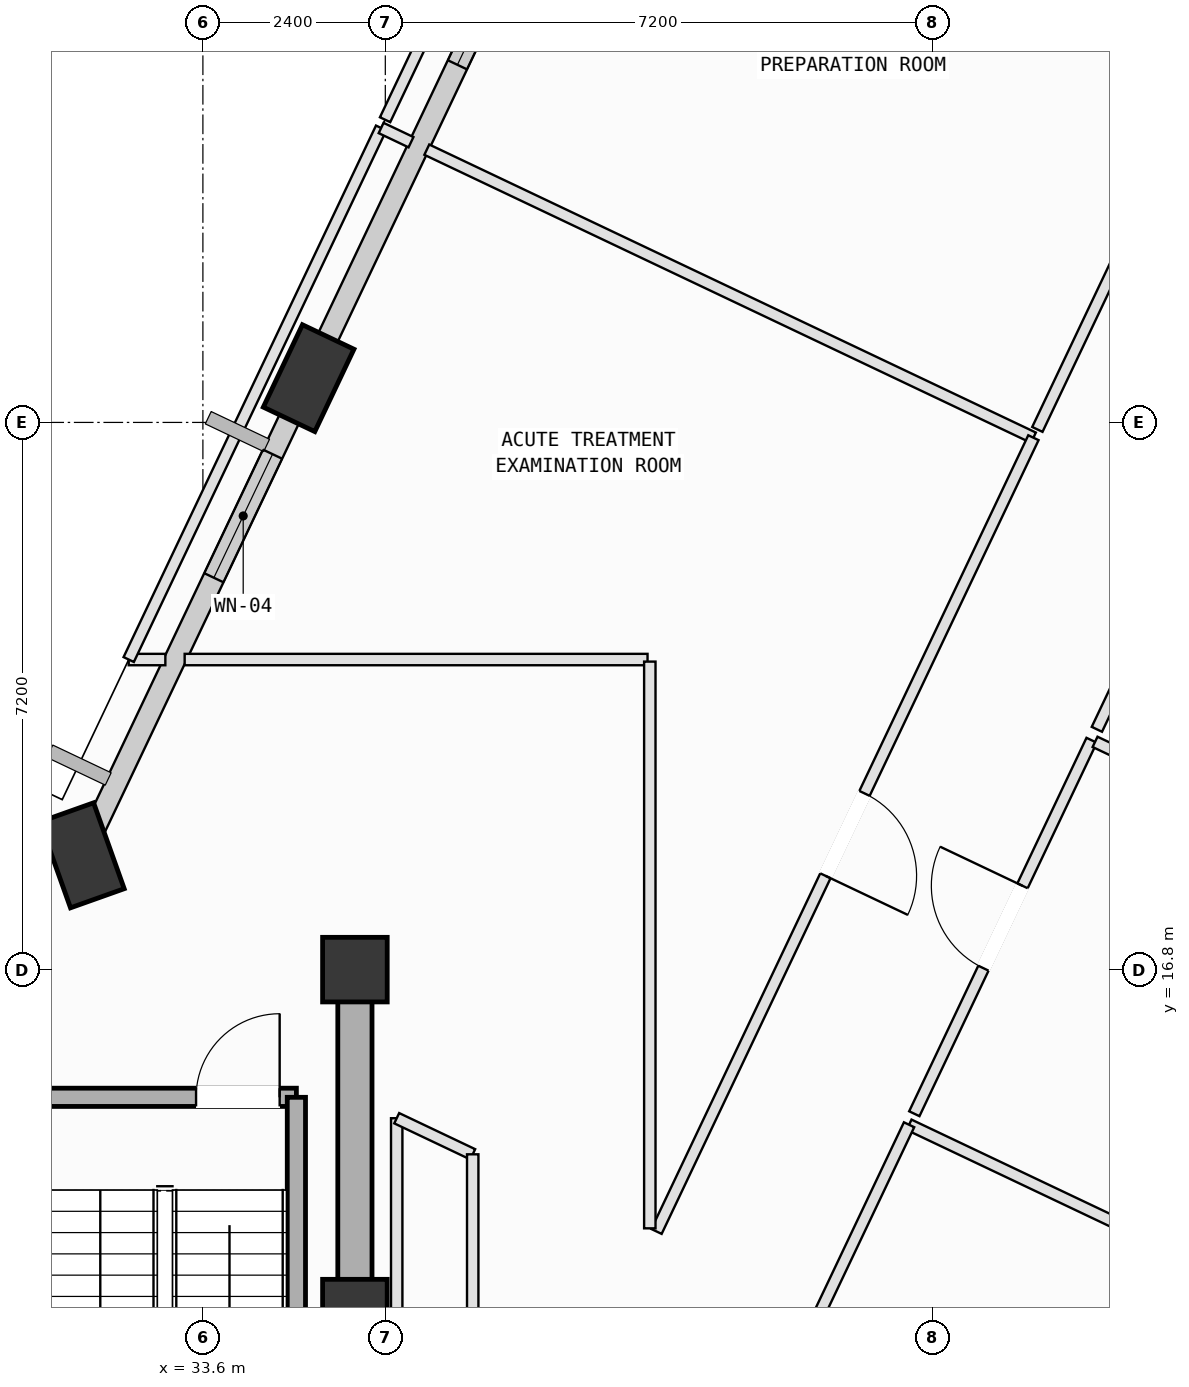
"""IFC4 building model, lengths in metres.
Left out: names, types, materials, properties, quantities, classifications, styles, units other than length and angle.
Written with IfcOpenShell. Run it as: python <this file> out.ifc"""

import sys

from ifc_helpers import new_model, si_unit, direction, frame, frame_2d, origin, origin_2d, place, context, subcontext, project, spatial, rectangle, extrude, element, fill, save


model = new_model("IFC4")
c1 = context("Model", 3, precision=1e-05, world=origin(), true_north=direction((0.0, 1.0)))
c2 = subcontext(c1, "Body", "Model", "MODEL_VIEW")
j1 = project(units=[si_unit("LENGTHUNIT", "METRE"), si_unit("PLANEANGLEUNIT", "RADIAN")], contexts=[c1])
p1 = place(None, origin())
s1 = spatial("IfcSite", under=j1, at=p1, CompositionType="ELEMENT")
p2 = place(p1, origin())
s2 = spatial("IfcBuilding", under=s1, at=p2, CompositionType="ELEMENT")
p3 = place(p2, frame((0.0, 0.0, 300.6)))
s3 = spatial("IfcBuildingStorey", under=s2, at=p3, CompositionType="ELEMENT", Elevation=300.6)
for number, where, z_axis, x_axis in (
    (1, (35.6, 12.3, 0.0), (0.0, 0.0, 1.0), (1.0, 0.0, 0.0)),
    (2, (35.6, 16.8, 0.0), (0.0, 0.0, 1.0), (1.0, 0.0, 0.0)),
):
    element("IfcColumn", number, at=place(p3, frame(where, z_axis=z_axis, x_axis=x_axis)), inside=s3, PredefinedType="COLUMN", context=c2, shape_type="SweptSolid", body=[
        extrude(rectangle(XDim=0.85, YDim=0.85, at=origin_2d()), origin(), (0.0, 0.0, 1.0), 4.0),
    ])
p4 = place(p3, frame((34.991, 24.582, 0.002), z_axis=(0.000855260499, 0.005803553386, 0.999982793501), x_axis=(-0.556050371387, -0.83113170028, 0.005299176292)))
e3 = element("IfcColumn", 3, at=p4, inside=s3, PredefinedType="COLUMN", context=c2, shape_type="SweptSolid", body=[
    extrude(rectangle(XDim=1.2, YDim=0.75, at=origin_2d()), origin(), (0.0, 0.0, 1.0), 3.996),
])
p5 = place(p3, frame((32.01, 18.304, 0.002), z_axis=(0.026991866876, -0.006412095072, 0.999615088001), x_axis=(-0.993728764911, -0.108720172199, 0.026135530332)))
e4 = element("IfcColumn", 4, at=p5, inside=s3, PredefinedType="COLUMN", context=c2, shape_type="SweptSolid", body=[
    extrude(rectangle(XDim=1.2, YDim=0.75, at=origin_2d()), origin(), (0.0, 0.0, 1.0), 3.998),
])
p6 = place(p3, frame((35.167, 24.951, 0.0), z_axis=(0.0, 0.0, 1.0), x_axis=(0.42889830824, 0.903352777817, 0.0)))
e5 = element("IfcWall", 5, at=p6, inside=s3, PredefinedType="SOLIDWALL", context=c2, shape_type="SweptSolid", body=[
    extrude(rectangle(XDim=6.409, YDim=0.28, at=frame_2d((3.205, 0.0))), origin(), (0.0, 0.0, 1.0), 3.265),
])
p7 = place(p6, frame((4.156, 0.0, 0.75)))
e6 = element("IfcOpeningElement", 6, at=p7, cuts=e5, PredefinedType="OPENING", context=c2, shape_type="SweptSolid", body=[
    extrude(rectangle(XDim=1.4, YDim=1.85, at=frame_2d((0.7, 0.925))), frame((0.0, 0.15, 0.0), z_axis=(0.0, -1.0, 0.0), x_axis=(1.0, 0.0, 0.0)), (0.0, 0.0, 1.0), 0.3),
])
p8 = place(p3, frame((32.184, 18.67, 0.0), z_axis=(0.0, 0.0, 1.0), x_axis=(0.428931463167, 0.90333703561, 0.0)))
e7 = element("IfcWall", 7, at=p8, inside=s3, PredefinedType="SOLIDWALL", context=c2, shape_type="SweptSolid", body=[
    extrude(rectangle(XDim=6.158, YDim=0.28, at=frame_2d((3.079, 0.0))), origin(), (0.0, 0.0, 1.0), 3.265),
])
p9 = place(p8, frame((3.638, 0.0, 0.75)))
e8 = element("IfcOpeningElement", 8, at=p9, cuts=e7, PredefinedType="OPENING", context=c2, shape_type="SweptSolid", body=[
    extrude(rectangle(XDim=1.8, YDim=2.05, at=frame_2d((0.9, 1.025))), frame((0.0, 0.15, 0.0), z_axis=(0.0, -1.0, 0.0), x_axis=(1.0, 0.0, 0.0)), (0.0, 0.0, 1.0), 0.3),
])
p10 = place(p3, frame((25.415, 21.436, 0.0), z_axis=(0.0, 0.0, 1.0), x_axis=(0.903343787047, -0.428917244236, 0.0)))
e9 = element("IfcWall", 9, at=p10, inside=s3, PredefinedType="SOLIDWALL", context=c2, shape_type="SweptSolid", body=[
    extrude(rectangle(XDim=6.958, YDim=0.28, at=frame_2d((3.479, 0.0))), origin(), (0.0, 0.0, 1.0), 3.165),
])
p11 = place(p3, frame((31.37, 15.12, 0.0), z_axis=(0.0, 0.0, 1.0), x_axis=(1.0, 0.0, 0.0)))
e10 = element("IfcWall", 10, at=p11, inside=s3, PredefinedType="SOLIDWALL", context=c2, shape_type="SweptSolid", body=[
    extrude(rectangle(XDim=3.46, YDim=0.24, at=frame_2d((1.73, 0.0))), origin(), (0.0, 0.0, 1.0), 3.78),
])
p12 = place(p11, frame((2.14, 0.0, 0.0)))
e11 = element("IfcOpeningElement", 11, at=p12, cuts=e10, PredefinedType="OPENING", context=c2, shape_type="SweptSolid", body=[
    extrude(rectangle(XDim=1.1, YDim=2.15, at=frame_2d((0.55, 1.075))), frame((0.0, 0.13, 0.0), z_axis=(0.0, -1.0, 0.0), x_axis=(1.0, 0.0, 0.0)), (0.0, 0.0, 1.0), 0.26),
])
p13 = place(p3, frame((34.83, 15.12, 0.0), z_axis=(0.0, 0.0, 1.0), x_axis=(0.0, -1.0, 0.0)))
e12 = element("IfcWall", 12, at=p13, inside=s3, PredefinedType="SOLIDWALL", context=c2, shape_type="SweptSolid", body=[
    extrude(rectangle(XDim=7.095, YDim=0.24, at=frame_2d((3.548, 0.0))), origin(), (0.0, 0.0, 1.0), 3.78),
])
p14 = place(p3, frame((35.6, 7.8, 0.0), z_axis=(0.0, 0.0, 1.0), x_axis=(0.0, 1.0, 0.0)))
e13 = element("IfcWall", 13, at=p14, inside=s3, PredefinedType="SHEAR", context=c2, shape_type="SweptSolid", body=[
    extrude(rectangle(XDim=9.0, YDim=0.45, at=frame_2d((4.5, 0.0))), origin(), (0.0, 0.0, 1.0), 3.78),
])
p15 = place(p3, frame((42.891, 14.759, 0.0), z_axis=(0.0, 0.0, 1.0), x_axis=(0.903330146776, -0.428945970871, 0.0)))
e14 = element("IfcWall", 14, at=p15, inside=s3, PredefinedType="PARTITIONING", context=c2, shape_type="SweptSolid", body=[
    extrude(rectangle(XDim=9.435, YDim=0.15, at=frame_2d((4.718, 0.0))), origin(), (0.0, 0.0, 1.0), 3.78),
])
p16 = place(p3, frame((39.48, 7.575, 0.0), z_axis=(0.0, 0.0, 1.0), x_axis=(0.428922806164, 0.903341146163, 0.0)))
e15 = element("IfcWall", 15, at=p16, inside=s3, PredefinedType="PARTITIONING", context=c2, shape_type="SweptSolid", body=[
    extrude(rectangle(XDim=7.953, YDim=0.15, at=frame_2d((3.977, 0.0))), origin(), (0.0, 0.0, 1.0), 3.78),
])
p17 = place(p16, frame((3.376, 0.0, 0.0)))
e16 = element("IfcOpeningElement", 16, at=p17, cuts=e15, PredefinedType="OPENING", context=c2, shape_type="SweptSolid", body=[
    extrude(rectangle(XDim=1.2, YDim=2.15, at=frame_2d((0.6, 1.075))), frame((0.0, 0.085, 0.0), z_axis=(0.0, -1.0, 0.0), x_axis=(1.0, 0.0, 0.0)), (0.0, 0.0, 1.0), 0.17),
])
p18 = place(p3, frame((42.96, 14.904, 0.0), z_axis=(0.0, 0.0, 1.0), x_axis=(0.428881036616, 0.903360977921, 0.0)))
e17 = element("IfcWall", 17, at=p18, inside=s3, PredefinedType="PARTITIONING", context=c2, shape_type="SweptSolid", body=[
    extrude(rectangle(XDim=5.44, YDim=0.15, at=frame_2d((2.72, 0.0))), origin(), (0.0, 0.0, 1.0), 3.78),
])
p19 = place(p18, frame((2.12, 0.0, 0.0)))
e18 = element("IfcOpeningElement", 18, at=p19, cuts=e17, PredefinedType="OPENING", context=c2, shape_type="SweptSolid", body=[
    extrude(rectangle(XDim=1.2, YDim=2.15, at=frame_2d((0.6, 1.075))), frame((0.0, 0.085, 0.0), z_axis=(0.0, -1.0, 0.0), x_axis=(1.0, 0.0, 0.0)), (0.0, 0.0, 1.0), 0.17),
])
p20 = place(p3, frame((45.338, 19.797, 0.0), z_axis=(0.0, 0.0, 1.0), x_axis=(0.90331631407, -0.428975100367, 0.0)))
e19 = element("IfcWall", 19, at=p20, inside=s3, PredefinedType="PARTITIONING", context=c2, shape_type="SweptSolid", body=[
    extrude(rectangle(XDim=9.385, YDim=0.15, at=frame_2d((4.693, 0.0))), origin(), (0.0, 0.0, 1.0), 3.78),
])
p21 = place(p3, frame((45.362, 19.962, 0.0), z_axis=(0.0, 0.0, 1.0), x_axis=(0.428857978155, 0.903371924831, 0.0)))
e20 = element("IfcWall", 20, at=p21, inside=s3, PredefinedType="PARTITIONING", context=c2, shape_type="SweptSolid", body=[
    extrude(rectangle(XDim=8.24, YDim=0.15, at=frame_2d((4.12, 0.0))), origin(), (0.0, 0.0, 1.0), 3.415),
])
p22 = place(p21, frame((3.52, 0.0, 0.0)))
e21 = element("IfcOpeningElement", 21, at=p22, cuts=e20, PredefinedType="OPENING", context=c2, shape_type="SweptSolid", body=[
    extrude(rectangle(XDim=1.2, YDim=2.15, at=frame_2d((0.6, 1.075))), frame((0.0, 0.085, 0.0), z_axis=(0.0, -1.0, 0.0), x_axis=(1.0, 0.0, 0.0)), (0.0, 0.0, 1.0), 0.17),
])
p23 = place(p3, frame((36.15, 7.5, 0.0), z_axis=(0.0, 0.0, 1.0), x_axis=(0.0, 1.0, 0.0)))
e22 = element("IfcWall", 22, at=p23, inside=s3, PredefinedType="PARTITIONING", context=c2, shape_type="SweptSolid", body=[
    extrude(rectangle(XDim=7.345, YDim=0.15, at=frame_2d((3.672, 0.0))), origin(), (0.0, 0.0, 1.0), 3.78),
])
p24 = place(p3, frame((36.15, 14.845, 0.0), z_axis=(0.0, 0.0, 1.0), x_axis=(0.90332878087, -0.428948847361, 0.0)))
e23 = element("IfcWall", 23, at=p24, inside=s3, PredefinedType="PARTITIONING", context=c2, shape_type="SweptSolid", body=[
    extrude(rectangle(XDim=1.107, YDim=0.15, at=frame_2d((0.553, 0.0))), origin(), (0.0, 0.0, 1.0), 3.78),
])
p25 = place(p3, frame((37.15, 14.37, 0.0), z_axis=(0.0, 0.0, 1.0), x_axis=(0.0, -1.0, 0.0)))
e24 = element("IfcWall", 24, at=p25, inside=s3, PredefinedType="PARTITIONING", context=c2, shape_type="SweptSolid", body=[
    extrude(rectangle(XDim=6.107, YDim=0.15, at=frame_2d((3.054, 0.0))), origin(), (0.0, 0.0, 1.0), 3.78),
])
p26 = place(p3, frame((39.45, 20.88, 0.0), z_axis=(0.0, 0.0, 1.0), x_axis=(-1.0, 0.0, 0.0)))
e25 = element("IfcWall", 25, at=p26, inside=s3, PredefinedType="PARTITIONING", context=c2, shape_type="SweptSolid", body=[
    extrude(rectangle(XDim=6.09, YDim=0.15, at=frame_2d((3.045, 0.0))), origin(), (0.0, 0.0, 1.0), 3.415),
])
p27 = place(p3, frame((33.106, 20.88, 0.0), z_axis=(0.0, 0.0, 1.0), x_axis=(-1.0, 0.0, 0.0)))
e26 = element("IfcWall", 26, at=p27, inside=s3, PredefinedType="PARTITIONING", context=c2, shape_type="SweptSolid", body=[
    extrude(rectangle(XDim=0.482, YDim=0.15, at=frame_2d((0.241, 0.0))), origin(), (0.0, 0.0, 1.0), 3.78),
])
p28 = place(p3, frame((32.624, 20.88, 0.0), z_axis=(0.0, 0.0, 1.0), x_axis=(0.428933318591, 0.903336154597, 0.0)))
e27 = element("IfcWall", 27, at=p28, inside=s3, PredefinedType="PARTITIONING", context=c2, shape_type="SweptSolid", body=[
    extrude(rectangle(XDim=7.743, YDim=0.15, at=frame_2d((3.871, 0.0))), origin(), (0.0, 0.0, 1.0), 3.78),
])
p29 = place(p3, frame((35.945, 27.874, 0.0), z_axis=(0.0, 0.0, 1.0), x_axis=(0.902902004989, -0.429846448615, 0.0)))
e28 = element("IfcWall", 28, at=p29, inside=s3, PredefinedType="PARTITIONING", context=c2, shape_type="SweptSolid", body=[
    extrude(rectangle(XDim=0.435, YDim=0.15, at=frame_2d((0.218, 0.0))), origin(), (0.0, 0.0, 1.0), 3.78),
])
p30 = place(p3, frame((36.546, 27.589, 0.0), z_axis=(0.0, 0.0, 1.0), x_axis=(0.903322745046, -0.428961558047, 0.0)))
e29 = element("IfcWall", 29, at=p30, inside=s3, PredefinedType="PARTITIONING", context=c2, shape_type="SweptSolid", body=[
    extrude(rectangle(XDim=8.835, YDim=0.15, at=frame_2d((4.418, 0.0))), origin(), (0.0, 0.0, 1.0), 3.78),
])
p31 = place(p3, frame((44.527, 23.799, 0.0), z_axis=(0.0, 0.0, 1.0), x_axis=(-0.428918545399, -0.90334316924, 0.0)))
e30 = element("IfcWall", 30, at=p31, inside=s3, PredefinedType="PARTITIONING", context=c2, shape_type="SweptSolid", body=[
    extrude(rectangle(XDim=11.562, YDim=0.15, at=frame_2d((5.781, 0.0))), origin(), (0.0, 0.0, 1.0), 3.78),
])
p32 = place(p31, frame((5.181, 0.0, 0.0)))
e31 = element("IfcOpeningElement", 31, at=p32, cuts=e30, PredefinedType="OPENING", context=c2, shape_type="SweptSolid", body=[
    extrude(rectangle(XDim=1.2, YDim=2.15, at=frame_2d((0.6, 1.075))), frame((0.0, 0.085, 0.0), z_axis=(0.0, -1.0, 0.0), x_axis=(1.0, 0.0, 0.0)), (0.0, 0.0, 1.0), 0.17),
])
p33 = place(p3, frame((39.48, 13.396, 0.0), z_axis=(0.0, 0.0, 1.0), x_axis=(0.0, 1.0, 0.0)))
e32 = element("IfcWall", 32, at=p33, inside=s3, PredefinedType="PARTITIONING", context=c2, shape_type="SweptSolid", body=[
    extrude(rectangle(XDim=7.457, YDim=0.15, at=frame_2d((3.729, 0.0))), origin(), (0.0, 0.0, 1.0), 3.78),
])
p34 = place(p3, frame((47.77, 30.628, 0.0), z_axis=(0.0, 0.0, 1.0), x_axis=(-0.428939661292, -0.90333314285, 0.0)))
e33 = element("IfcWall", 33, at=p34, inside=s3, PredefinedType="PARTITIONING", context=c2, shape_type="SweptSolid", body=[
    extrude(rectangle(XDim=7.439, YDim=0.15, at=frame_2d((3.719, 0.0))), origin(), (0.0, 0.0, 1.0), 3.78),
])
p35 = place(p34, frame((3.12, 0.0, 0.0)))
e34 = element("IfcOpeningElement", 34, at=p35, cuts=e33, PredefinedType="OPENING", context=c2, shape_type="SweptSolid", body=[
    extrude(rectangle(XDim=1.2, YDim=2.15, at=frame_2d((0.6, 1.075))), frame((0.0, 0.085, 0.0), z_axis=(0.0, -1.0, 0.0), x_axis=(1.0, 0.0, 0.0)), (0.0, 0.0, 1.0), 0.17),
])
p36 = place(p3, frame((35.997, 27.983, 0.0), z_axis=(0.0, 0.0, 1.0), x_axis=(0.428939661292, 0.90333314285, 0.0)))
e35 = element("IfcWall", 35, at=p36, inside=s3, PredefinedType="PARTITIONING", context=c2, shape_type="SweptSolid", body=[
    extrude(rectangle(XDim=7.439, YDim=0.15, at=frame_2d((3.719, 0.0))), origin(), (0.0, 0.0, 1.0), 3.265),
])
p37 = place(p7, origin())
e36 = element("IfcWindow", 36, at=p37, inside=s3, PartitioningType="SINGLE_PANEL", PredefinedType="WINDOW", context=c2, shape_type="SweptSolid", body=[
    extrude(rectangle(XDim=1.4, YDim=1.85, at=frame_2d((0.7, 0.925))), frame((0.0, 0.03, 0.0), z_axis=(0.0, -1.0, 0.0), x_axis=(1.0, 0.0, 0.0)), (0.0, 0.0, 1.0), 0.06),
])
fill(e6, e36)
p38 = place(p9, origin())
e37 = element("IfcWindow", 37, at=p38, inside=s3, PartitioningType="SINGLE_PANEL", PredefinedType="WINDOW", context=c2, shape_type="SweptSolid", body=[
    extrude(rectangle(XDim=1.8, YDim=2.05, at=frame_2d((0.9, 1.025))), frame((0.0, 0.03, 0.0), z_axis=(0.0, -1.0, 0.0), x_axis=(1.0, 0.0, 0.0)), (0.0, 0.0, 1.0), 0.06),
])
fill(e8, e37)
p39 = place(p12, origin())
e38 = element("IfcDoor", 38, at=p39, inside=s3, OperationType="SINGLE_SWING_RIGHT", PredefinedType="DOOR", context=c2, shape_type="SweptSolid", body=[
    extrude(rectangle(XDim=1.1, YDim=2.15, at=frame_2d((0.55, 1.075))), frame((0.0, 0.025, 0.0), z_axis=(0.0, -1.0, 0.0), x_axis=(1.0, 0.0, 0.0)), (0.0, 0.0, 1.0), 0.05),
])
fill(e11, e38)
p40 = place(p19, origin())
e39 = element("IfcDoor", 39, at=p40, inside=s3, OperationType="SINGLE_SWING_RIGHT", PredefinedType="DOOR", context=c2, shape_type="SweptSolid", body=[
    extrude(rectangle(XDim=1.2, YDim=2.15, at=frame_2d((0.6, 1.075))), frame((0.0, 0.025, 0.0), z_axis=(0.0, -1.0, 0.0), x_axis=(1.0, 0.0, 0.0)), (0.0, 0.0, 1.0), 0.05),
])
fill(e18, e39)
p41 = place(p32, origin())
e40 = element("IfcDoor", 40, at=p41, inside=s3, OperationType="SINGLE_SWING_RIGHT", PredefinedType="DOOR", context=c2, shape_type="SweptSolid", body=[
    extrude(rectangle(XDim=1.2, YDim=2.15, at=frame_2d((0.6, 1.075))), frame((0.0, 0.025, 0.0), z_axis=(0.0, -1.0, 0.0), x_axis=(1.0, 0.0, 0.0)), (0.0, 0.0, 1.0), 0.05),
])
fill(e31, e40)
save(model, sys.argv[1])
